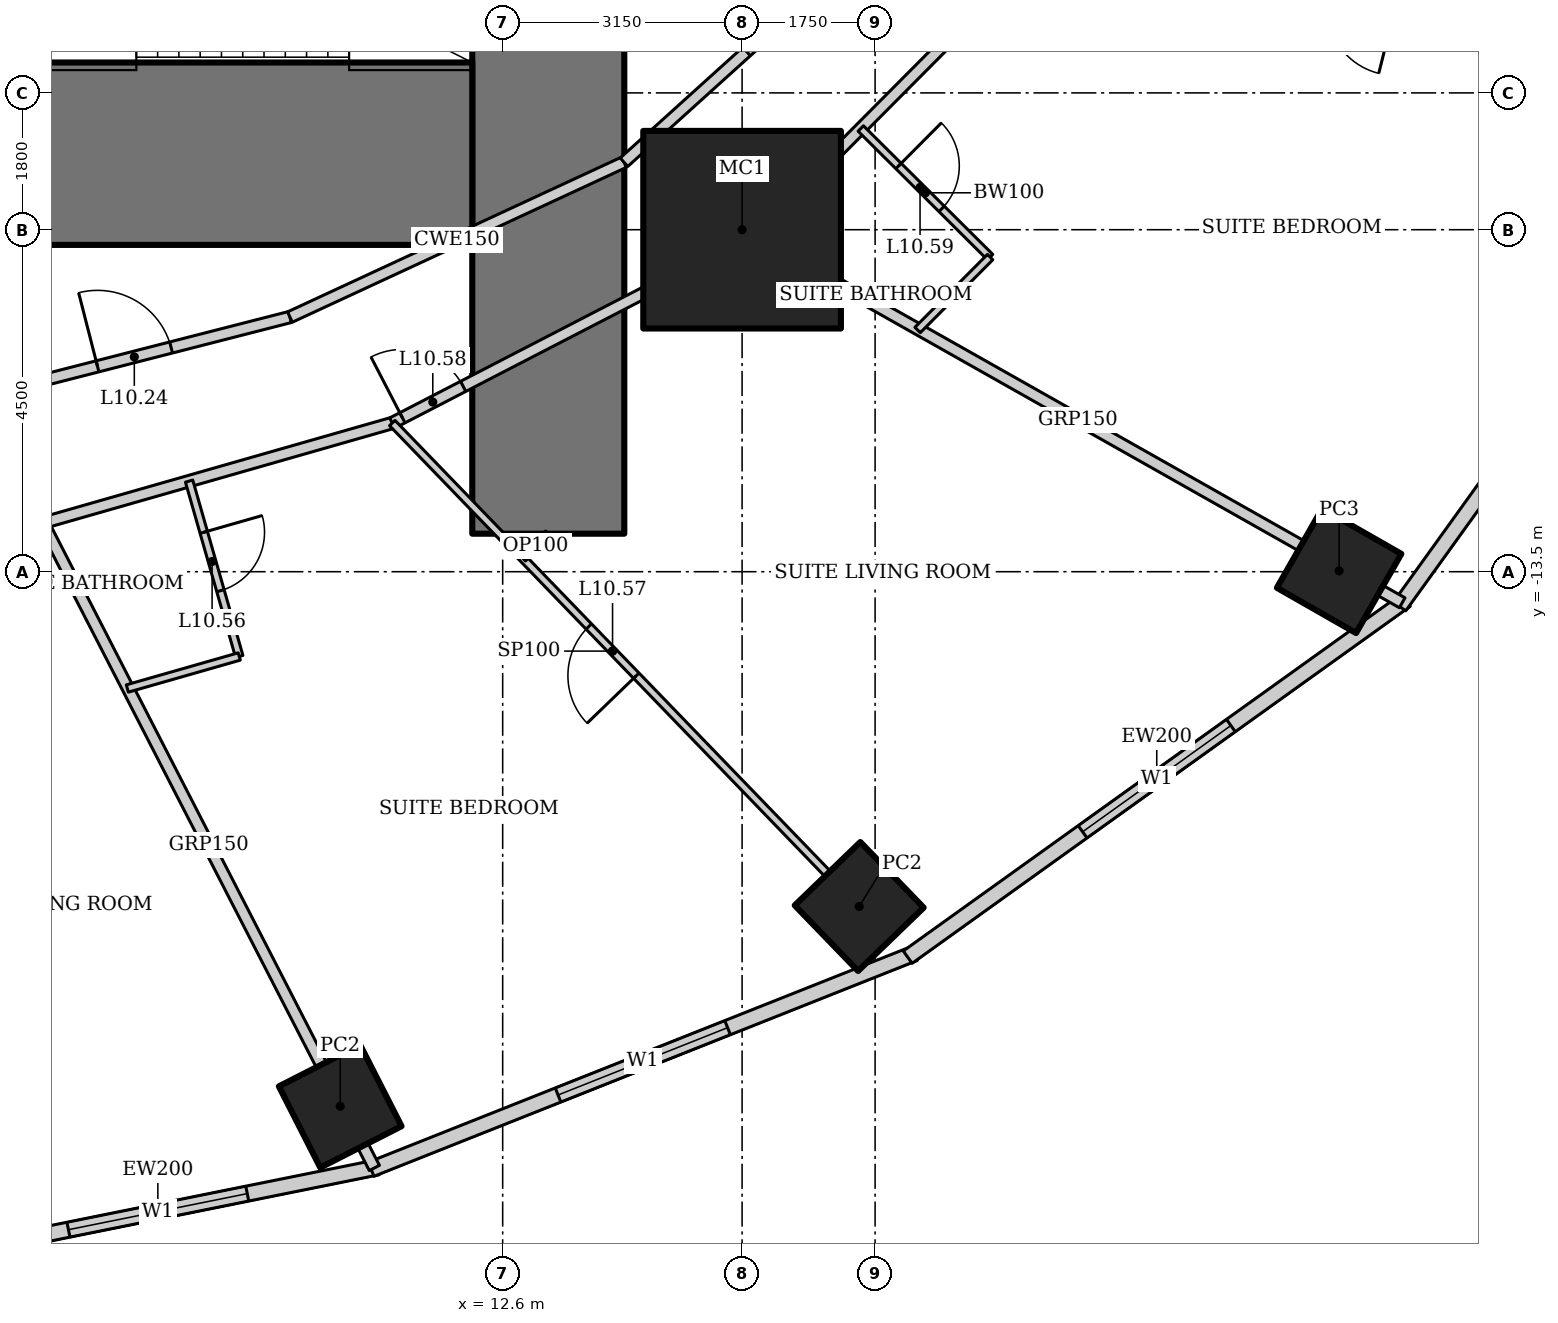
"""IFC4 building model, lengths in metres.
Left out: names, types, materials, properties, quantities, classifications, styles, units other than length and angle.
Written with IfcOpenShell. Run it as: python <this file> out.ifc"""

import sys

from ifc_helpers import new_model, si_unit, direction, frame, frame_2d, origin, origin_2d, place, context, subcontext, project, spatial, rectangle, hollow_rectangle, extrude, element, fill, save


model = new_model("IFC4")
c1 = context("Model", 3, precision=1e-05, world=origin(), true_north=direction((0.0, 1.0)))
c2 = subcontext(c1, "Body", "Model", "MODEL_VIEW")
j1 = project(units=[si_unit("LENGTHUNIT", "METRE"), si_unit("PLANEANGLEUNIT", "RADIAN")], contexts=[c1])
p1 = place(None, origin())
s1 = spatial("IfcSite", under=j1, at=p1, CompositionType="ELEMENT")
p2 = place(p1, origin())
s2 = spatial("IfcBuilding", under=s1, at=p2, CompositionType="ELEMENT")
p3 = place(p2, frame((0.0, 0.0, 51.4)))
s3 = spatial("IfcBuildingStorey", under=s2, at=p3, CompositionType="ELEMENT", Elevation=51.4)
p4 = place(p3, frame((15.75, -9.0, 0.0), z_axis=(0.0, 0.0, 1.0), x_axis=(1.0, 0.0, 0.0)))
e1 = element("IfcColumn", 1, at=p4, inside=s3, PredefinedType="COLUMN", context=c2, shape_type="SweptSolid", body=[
    extrude(hollow_rectangle(XDim=2.6, YDim=2.6, WallThickness=0.13, at=origin_2d()), origin(), (0.0, 0.0, 1.0), 3.6),
])
for number, where, z_axis, x_axis in (
    (2, (10.463, -20.534, 0.0), (0.0, 0.0, 1.0), (0.891, 0.454, 0.0)),
    (3, (17.291, -17.905, 0.0), (0.0, 0.0, 1.0), (0.719, 0.695, 0.0)),
):
    element("IfcColumn", number, at=place(p3, frame(where, z_axis=z_axis, x_axis=x_axis)), inside=s3, PredefinedType="COLUMN", context=c2, shape_type="SweptSolid", body=[
        extrude(hollow_rectangle(XDim=1.2, YDim=1.2, WallThickness=0.1, at=origin_2d()), origin(), (0.0, 0.0, 1.0), 3.6),
    ])
p5 = place(p3, frame((23.605, -13.489, 0.0), z_axis=(0.0, 0.0, 1.0), x_axis=(0.496139221777, 0.86824298017, 0.0)))
e4 = element("IfcColumn", 4, at=p5, inside=s3, PredefinedType="COLUMN", context=c2, shape_type="SweptSolid", body=[
    extrude(hollow_rectangle(XDim=1.2, YDim=1.2, WallThickness=0.12, at=origin_2d()), origin(), (0.0, 0.0, 1.0), 3.6),
])
p6 = place(p3, frame((13.2, -13.0, 0.0), z_axis=(0.0, 0.0, 1.0), x_axis=(0.0, 1.0, 0.0)))
e5 = element("IfcWall", 5, at=p6, inside=s3, PredefinedType="SHEAR", context=c2, shape_type="SweptSolid", body=[
    extrude(rectangle(XDim=26.0, YDim=2.0, at=frame_2d((13.0, 0.0))), origin(), (0.0, 0.0, 1.0), 3.6),
])
p7 = place(p6, frame((12.1, 0.0, 0.0)))
e6 = element("IfcOpeningElement", 6, at=p7, cuts=e5, PredefinedType="OPENING", context=c2, shape_type="SweptSolid", body=[
    extrude(rectangle(XDim=1.8, YDim=2.1, at=frame_2d((0.9, 1.05))), frame((0.0, 1.01, 0.0), z_axis=(0.0, -1.0, 0.0), x_axis=(1.0, 0.0, 0.0)), (0.0, 0.0, 1.0), 2.02),
])
p8 = place(p3, frame((-12.2, -8.0, 0.0), z_axis=(0.0, 0.0, 1.0), x_axis=(1.0, 0.0, 0.0)))
e7 = element("IfcWall", 7, at=p8, inside=s3, PredefinedType="SHEAR", context=c2, shape_type="SweptSolid", body=[
    extrude(rectangle(XDim=24.4, YDim=2.4, at=frame_2d((12.2, 0.0))), origin(), (0.0, 0.0, 1.0), 3.6),
])
p9 = place(p3, frame((5.17, -22.504, 0.0), z_axis=(0.0, 0.0, 1.0), x_axis=(0.980251657452, 0.197754110105, 0.0)))
e8 = element("IfcWall", 8, at=p9, inside=s3, PredefinedType="SOLIDWALL", context=c2, shape_type="SweptSolid", body=[
    extrude(rectangle(XDim=5.904, YDim=0.2, at=frame_2d((2.952, 0.0))), origin(), (0.0, 0.0, 1.0), 3.45),
])
p10 = place(p9, frame((1.752, 0.0, 0.5)))
e9 = element("IfcOpeningElement", 9, at=p10, cuts=e8, PredefinedType="OPENING", context=c2, shape_type="SweptSolid", body=[
    extrude(rectangle(XDim=2.4, YDim=2.2, at=frame_2d((1.2, 1.1))), frame((0.0, 0.11, 0.0), z_axis=(0.0, -1.0, 0.0), x_axis=(1.0, 0.0, 0.0)), (0.0, 0.0, 1.0), 0.22),
])
p11 = place(p3, frame((10.869, -21.363, 0.0), z_axis=(0.0, 0.0, 1.0), x_axis=(0.929358351251, 0.369178892895, 0.0)))
e10 = element("IfcWall", 10, at=p11, inside=s3, PredefinedType="SOLIDWALL", context=c2, shape_type="SweptSolid", body=[
    extrude(rectangle(XDim=7.692, YDim=0.2, at=frame_2d((3.846, 0.0))), origin(), (0.0, 0.0, 1.0), 3.45),
])
p12 = place(p11, frame((2.646, 0.0, 0.5)))
e11 = element("IfcOpeningElement", 11, at=p12, cuts=e10, PredefinedType="OPENING", context=c2, shape_type="SweptSolid", body=[
    extrude(rectangle(XDim=2.4, YDim=2.2, at=frame_2d((1.2, 1.1))), frame((0.0, 0.11, 0.0), z_axis=(0.0, -1.0, 0.0), x_axis=(1.0, 0.0, 0.0)), (0.0, 0.0, 1.0), 0.22),
])
p13 = place(p3, frame((17.929, -18.572, 0.0), z_axis=(0.0, 0.0, 1.0), x_axis=(0.812791321576, 0.582554948112, 0.0)))
e12 = element("IfcWall", 12, at=p13, inside=s3, PredefinedType="SOLIDWALL", context=c2, shape_type="SweptSolid", body=[
    extrude(rectangle(XDim=8.063, YDim=0.2, at=frame_2d((4.032, 0.0))), origin(), (0.0, 0.0, 1.0), 3.45),
])
p14 = place(p13, frame((2.832, 0.0, 0.5)))
e13 = element("IfcOpeningElement", 13, at=p14, cuts=e12, PredefinedType="OPENING", context=c2, shape_type="SweptSolid", body=[
    extrude(rectangle(XDim=2.4, YDim=2.2, at=frame_2d((1.2, 1.1))), frame((0.0, 0.11, 0.0), z_axis=(0.0, -1.0, 0.0), x_axis=(1.0, 0.0, 0.0)), (0.0, 0.0, 1.0), 0.22),
])
p15 = place(p3, frame((24.4, -13.957, 0.0), z_axis=(0.0, 0.0, 1.0), x_axis=(0.583937613703, 0.811798536155, 0.0)))
e14 = element("IfcWall", 14, at=p15, inside=s3, PredefinedType="SOLIDWALL", context=c2, shape_type="SweptSolid", body=[
    extrude(rectangle(XDim=8.323, YDim=0.2, at=frame_2d((4.162, 0.0))), origin(), (0.0, 0.0, 1.0), 3.45),
])
p16 = place(p15, frame((2.961, 0.0, 0.5)))
e15 = element("IfcOpeningElement", 15, at=p16, cuts=e14, PredefinedType="OPENING", context=c2, shape_type="SweptSolid", body=[
    extrude(rectangle(XDim=2.4, YDim=2.2, at=frame_2d((1.2, 1.1))), frame((0.0, 0.11, 0.0), z_axis=(0.0, -1.0, 0.0), x_axis=(1.0, 0.0, 0.0)), (0.0, 0.0, 1.0), 0.22),
])
p17 = place(p3, frame((10.912, -21.346, 0.0), z_axis=(0.0, 0.0, 1.0), x_axis=(-0.456950233066, 0.889492262193, 0.0)))
e16 = element("IfcWall", 16, at=p17, inside=s3, PredefinedType="PARTITIONING", context=c2, shape_type="SweptSolid", body=[
    extrude(rectangle(XDim=9.542, YDim=0.15, at=frame_2d((4.771, 0.0))), origin(), (0.0, 0.0, 1.0), 2.528),
])
p18 = place(p3, frame((24.435, -13.909, 0.0), z_axis=(0.0, 0.0, 1.0), x_axis=(-0.870612006791, 0.491970256856, 0.0)))
e17 = element("IfcWall", 17, at=p18, inside=s3, PredefinedType="PARTITIONING", context=c2, shape_type="SweptSolid", body=[
    extrude(rectangle(XDim=9.802, YDim=0.15, at=frame_2d((4.901, 0.0))), origin(), (0.0, 0.0, 1.0), 2.693),
])
p19 = place(p3, frame((6.552, -12.858, 0.0), z_axis=(0.0, 0.0, 1.0), x_axis=(0.961464178199, 0.27493023486, 0.0)))
e18 = element("IfcWall", 18, at=p19, inside=s3, PredefinedType="PARTITIONING", context=c2, shape_type="SweptSolid", body=[
    extrude(rectangle(XDim=4.78, YDim=0.15, at=frame_2d((2.39, 0.0))), origin(), (0.0, 0.0, 1.0), 3.45),
])
p20 = place(p3, frame((11.147, -11.544, 0.0), z_axis=(0.0, 0.0, 1.0), x_axis=(0.888333171507, 0.459199495209, 0.0)))
e19 = element("IfcWall", 19, at=p20, inside=s3, PredefinedType="PARTITIONING", context=c2, shape_type="SweptSolid", body=[
    extrude(rectangle(XDim=5.351, YDim=0.15, at=frame_2d((2.676, 0.0))), origin(), (0.0, 0.0, 1.0), 3.45),
])
p21 = place(p20, frame((0.15, 0.0, 0.0)))
e20 = element("IfcOpeningElement", 20, at=p21, cuts=e19, PredefinedType="OPENING", context=c2, shape_type="SweptSolid", body=[
    extrude(rectangle(XDim=0.9, YDim=2.1, at=frame_2d((0.45, 1.05))), frame((0.0, 0.085, 0.0), z_axis=(0.0, -1.0, 0.0), x_axis=(1.0, 0.0, 0.0)), (0.0, 0.0, 1.0), 0.17),
])
p22 = place(p3, frame((15.901, -9.086, 0.0), z_axis=(0.0, 0.0, 1.0), x_axis=(0.705121546414, 0.709086457904, 0.0)))
e21 = element("IfcWall", 21, at=p22, inside=s3, PredefinedType="PARTITIONING", context=c2, shape_type="SweptSolid", body=[
    extrude(rectangle(XDim=5.788, YDim=0.15, at=frame_2d((2.894, 0.0))), origin(), (0.0, 0.0, 1.0), 3.45),
])
p23 = place(p3, frame((5.706, -11.198, 0.0), z_axis=(0.0, 0.0, 1.0), x_axis=(0.968705891355, 0.248211393886, 0.0)))
e22 = element("IfcWall", 22, at=p23, inside=s3, PredefinedType="PARTITIONING", context=c2, shape_type="SweptSolid", body=[
    extrude(rectangle(XDim=4.228, YDim=0.15, at=frame_2d((2.114, 0.0))), origin(), (0.0, 0.0, 1.0), 3.45),
])
p24 = place(p23, frame((1.614, 0.0, 0.0)))
e23 = element("IfcOpeningElement", 23, at=p24, cuts=e22, PredefinedType="OPENING", context=c2, shape_type="SweptSolid", body=[
    extrude(rectangle(XDim=1.0, YDim=2.1, at=frame_2d((0.5, 1.05))), frame((0.0, 0.085, 0.0), z_axis=(0.0, -1.0, 0.0), x_axis=(1.0, 0.0, 0.0)), (0.0, 0.0, 1.0), 0.17),
])
p25 = place(p3, frame((9.801, -10.149, 0.0), z_axis=(0.0, 0.0, 1.0), x_axis=(0.907279653965, 0.420527798727, 0.0)))
e24 = element("IfcWall", 24, at=p25, inside=s3, PredefinedType="PARTITIONING", context=c2, shape_type="SweptSolid", body=[
    extrude(rectangle(XDim=4.844, YDim=0.15, at=frame_2d((2.422, 0.0))), origin(), (0.0, 0.0, 1.0), 3.45),
])
p26 = place(p3, frame((14.196, -8.112, 0.0), z_axis=(0.0, 0.0, 1.0), x_axis=(0.742194222, 0.670184852731, 0.0)))
e25 = element("IfcWall", 25, at=p26, inside=s3, PredefinedType="PARTITIONING", context=c2, shape_type="SweptSolid", body=[
    extrude(rectangle(XDim=5.347, YDim=0.15, at=frame_2d((2.673, 0.0))), origin(), (0.0, 0.0, 1.0), 3.45),
])
p27 = place(p26, frame((2.173, 0.0, 0.0)))
e26 = element("IfcOpeningElement", 26, at=p27, cuts=e25, PredefinedType="OPENING", context=c2, shape_type="SweptSolid", body=[
    extrude(rectangle(XDim=1.0, YDim=2.1, at=frame_2d((0.5, 1.05))), frame((0.0, 0.085, 0.0), z_axis=(0.0, -1.0, 0.0), x_axis=(1.0, 0.0, 0.0)), (0.0, 0.0, 1.0), 0.17),
])
p28 = place(p3, frame((8.474, -12.308, 0.0), z_axis=(0.0, 0.0, 1.0), x_axis=(0.27497640313, -0.961450975205, 0.0)))
e27 = element("IfcWall", 27, at=p28, inside=s3, PredefinedType="PARTITIONING", context=c2, shape_type="SweptSolid", body=[
    extrude(rectangle(XDim=2.4, YDim=0.1, at=frame_2d((1.2, 0.0))), origin(), (0.0, 0.0, 1.0), 3.45),
])
p29 = place(p28, frame((0.7, 0.0, 0.0)))
e28 = element("IfcOpeningElement", 28, at=p29, cuts=e27, PredefinedType="OPENING", context=c2, shape_type="SweptSolid", body=[
    extrude(rectangle(XDim=0.8, YDim=2.1, at=frame_2d((0.4, 1.05))), frame((0.0, 0.06, 0.0), z_axis=(0.0, -1.0, 0.0), x_axis=(1.0, 0.0, 0.0)), (0.0, 0.0, 1.0), 0.12),
])
p30 = place(p3, frame((9.134, -14.615, 0.0), z_axis=(0.0, 0.0, 1.0), x_axis=(-0.96145775668, -0.274952690695, 0.0)))
e29 = element("IfcWall", 29, at=p30, inside=s3, PredefinedType="PARTITIONING", context=c2, shape_type="SweptSolid", body=[
    extrude(rectangle(XDim=1.532, YDim=0.1, at=frame_2d((0.766, 0.0))), origin(), (0.0, 0.0, 1.0), 3.45),
])
p31 = place(p3, frame((16.944, -17.545, 0.0), z_axis=(0.0, 0.0, 1.0), x_axis=(-0.694680670522, 0.71931826475, 0.0)))
e30 = element("IfcWall", 30, at=p31, inside=s3, PredefinedType="PARTITIONING", context=c2, shape_type="SweptSolid", body=[
    extrude(rectangle(XDim=8.344, YDim=0.1, at=frame_2d((4.172, 0.0))), origin(), (0.0, 0.0, 1.0), 2.528),
])
p32 = place(p31, frame((3.722, 0.0, 0.0)))
e31 = element("IfcOpeningElement", 31, at=p32, cuts=e30, PredefinedType="OPENING", context=c2, shape_type="SweptSolid", body=[
    extrude(rectangle(XDim=0.9, YDim=2.1, at=frame_2d((0.45, 1.05))), frame((0.0, 0.06, 0.0), z_axis=(0.0, -1.0, 0.0), x_axis=(1.0, 0.0, 0.0)), (0.0, 0.0, 1.0), 0.12),
])
p33 = place(p3, frame((17.311, -7.668, 0.0), z_axis=(0.0, 0.0, 1.0), x_axis=(0.709138392716, -0.705069315724, 0.0)))
e32 = element("IfcWall", 32, at=p33, inside=s3, PredefinedType="PARTITIONING", context=c2, shape_type="SweptSolid", body=[
    extrude(rectangle(XDim=2.4, YDim=0.1, at=frame_2d((1.2, 0.0))), origin(), (0.0, 0.0, 1.0), 3.45),
])
p34 = place(p33, frame((0.7, 0.0, 0.0)))
e33 = element("IfcOpeningElement", 33, at=p34, cuts=e32, PredefinedType="OPENING", context=c2, shape_type="SweptSolid", body=[
    extrude(rectangle(XDim=0.8, YDim=2.1, at=frame_2d((0.4, 1.05))), frame((0.0, 0.06, 0.0), z_axis=(0.0, -1.0, 0.0), x_axis=(1.0, 0.0, 0.0)), (0.0, 0.0, 1.0), 0.12),
])
p35 = place(p3, frame((19.013, -9.36, 0.0), z_axis=(0.0, 0.0, 1.0), x_axis=(-0.7051187611, -0.709089227633, 0.0)))
e34 = element("IfcWall", 34, at=p35, inside=s3, PredefinedType="PARTITIONING", context=c2, shape_type="SweptSolid", body=[
    extrude(rectangle(XDim=1.353, YDim=0.1, at=frame_2d((0.676, 0.0))), origin(), (0.0, 0.0, 1.0), 3.45),
])
p36 = place(p3, frame((27.833, -6.939, 0.0), z_axis=(0.0, 0.0, 1.0), x_axis=(-0.97029673161, 0.24191786339, 0.0)))
e35 = element("IfcWall", 35, at=p36, inside=s3, PredefinedType="PARTITIONING", context=c2, shape_type="SweptSolid", body=[
    extrude(rectangle(XDim=8.091, YDim=0.1, at=frame_2d((4.045, 0.0))), origin(), (0.0, 0.0, 1.0), 2.333),
])
p37 = place(p36, frame((3.595, 0.0, 0.0)))
e36 = element("IfcOpeningElement", 36, at=p37, cuts=e35, PredefinedType="OPENING", context=c2, shape_type="SweptSolid", body=[
    extrude(rectangle(XDim=0.9, YDim=2.1, at=frame_2d((0.45, 1.05))), frame((0.0, 0.06, 0.0), z_axis=(0.0, -1.0, 0.0), x_axis=(1.0, 0.0, 0.0)), (0.0, 0.0, 1.0), 0.12),
])
p38 = place(p3, frame((13.2, -13.0, 0.0), z_axis=(0.0, 0.0, 1.0), x_axis=(-0.719347134512, -0.69465077562, 0.0)))
e37 = element("IfcWall", 37, at=p38, inside=s3, PredefinedType="PARTITIONING", context=c2, shape_type="SweptSolid", body=[
    extrude(rectangle(XDim=0.465, YDim=0.1, at=frame_2d((0.232, 0.0))), origin(), (0.0, 0.0, 1.0), 3.45),
])
p39 = place(p10, origin())
e38 = element("IfcWindow", 38, at=p39, inside=s3, PartitioningType="SINGLE_PANEL", PredefinedType="WINDOW", context=c2, shape_type="SweptSolid", body=[
    extrude(rectangle(XDim=2.4, YDim=2.2, at=frame_2d((1.2, 1.1))), frame((0.0, 0.03, 0.0), z_axis=(0.0, -1.0, 0.0), x_axis=(1.0, 0.0, 0.0)), (0.0, 0.0, 1.0), 0.06),
])
fill(e9, e38)
p40 = place(p12, origin())
e39 = element("IfcWindow", 39, at=p40, inside=s3, PartitioningType="SINGLE_PANEL", PredefinedType="WINDOW", context=c2, shape_type="SweptSolid", body=[
    extrude(rectangle(XDim=2.4, YDim=2.2, at=frame_2d((1.2, 1.1))), frame((0.0, 0.03, 0.0), z_axis=(0.0, -1.0, 0.0), x_axis=(1.0, 0.0, 0.0)), (0.0, 0.0, 1.0), 0.06),
])
fill(e11, e39)
p41 = place(p14, origin())
e40 = element("IfcWindow", 40, at=p41, inside=s3, PartitioningType="SINGLE_PANEL", PredefinedType="WINDOW", context=c2, shape_type="SweptSolid", body=[
    extrude(rectangle(XDim=2.4, YDim=2.2, at=frame_2d((1.2, 1.1))), frame((0.0, 0.03, 0.0), z_axis=(0.0, -1.0, 0.0), x_axis=(1.0, 0.0, 0.0)), (0.0, 0.0, 1.0), 0.06),
])
fill(e13, e40)
p42 = place(p27, origin())
e41 = element("IfcDoor", 41, at=p42, inside=s3, OperationType="SINGLE_SWING_LEFT", PredefinedType="DOOR", context=c2, shape_type="SweptSolid", body=[
    extrude(rectangle(XDim=1.0, YDim=2.1, at=frame_2d((0.5, 1.05))), frame((0.0, 0.025, 0.0), z_axis=(0.0, -1.0, 0.0), x_axis=(1.0, 0.0, 0.0)), (0.0, 0.0, 1.0), 0.05),
])
fill(e26, e41)
p43 = place(p24, origin())
e42 = element("IfcDoor", 42, at=p43, inside=s3, OperationType="SINGLE_SWING_LEFT", PredefinedType="DOOR", context=c2, shape_type="SweptSolid", body=[
    extrude(rectangle(XDim=1.0, YDim=2.1, at=frame_2d((0.5, 1.05))), frame((0.0, 0.025, 0.0), z_axis=(0.0, -1.0, 0.0), x_axis=(1.0, 0.0, 0.0)), (0.0, 0.0, 1.0), 0.05),
])
fill(e23, e42)
p44 = place(p29, origin())
e43 = element("IfcDoor", 43, at=p44, inside=s3, OperationType="SINGLE_SWING_LEFT", PredefinedType="DOOR", context=c2, shape_type="SweptSolid", body=[
    extrude(rectangle(XDim=0.8, YDim=2.1, at=frame_2d((0.4, 1.05))), frame((0.0, 0.025, 0.0), z_axis=(0.0, -1.0, 0.0), x_axis=(1.0, 0.0, 0.0)), (0.0, 0.0, 1.0), 0.05),
])
fill(e28, e43)
p45 = place(p32, origin())
e44 = element("IfcDoor", 44, at=p45, inside=s3, OperationType="SINGLE_SWING_LEFT", PredefinedType="DOOR", context=c2, shape_type="SweptSolid", body=[
    extrude(rectangle(XDim=0.9, YDim=2.1, at=frame_2d((0.45, 1.05))), frame((0.0, 0.025, 0.0), z_axis=(0.0, -1.0, 0.0), x_axis=(1.0, 0.0, 0.0)), (0.0, 0.0, 1.0), 0.05),
])
fill(e31, e44)
p46 = place(p21, origin())
e45 = element("IfcDoor", 45, at=p46, inside=s3, OperationType="SINGLE_SWING_LEFT", PredefinedType="DOOR", context=c2, shape_type="SweptSolid", body=[
    extrude(rectangle(XDim=0.9, YDim=2.1, at=frame_2d((0.45, 1.05))), frame((0.0, 0.025, 0.0), z_axis=(0.0, -1.0, 0.0), x_axis=(1.0, 0.0, 0.0)), (0.0, 0.0, 1.0), 0.05),
])
fill(e20, e45)
p47 = place(p34, origin())
e46 = element("IfcDoor", 46, at=p47, inside=s3, OperationType="SINGLE_SWING_LEFT", PredefinedType="DOOR", context=c2, shape_type="SweptSolid", body=[
    extrude(rectangle(XDim=0.8, YDim=2.1, at=frame_2d((0.4, 1.05))), frame((0.0, 0.025, 0.0), z_axis=(0.0, -1.0, 0.0), x_axis=(1.0, 0.0, 0.0)), (0.0, 0.0, 1.0), 0.05),
])
fill(e33, e46)
save(model, sys.argv[1])
